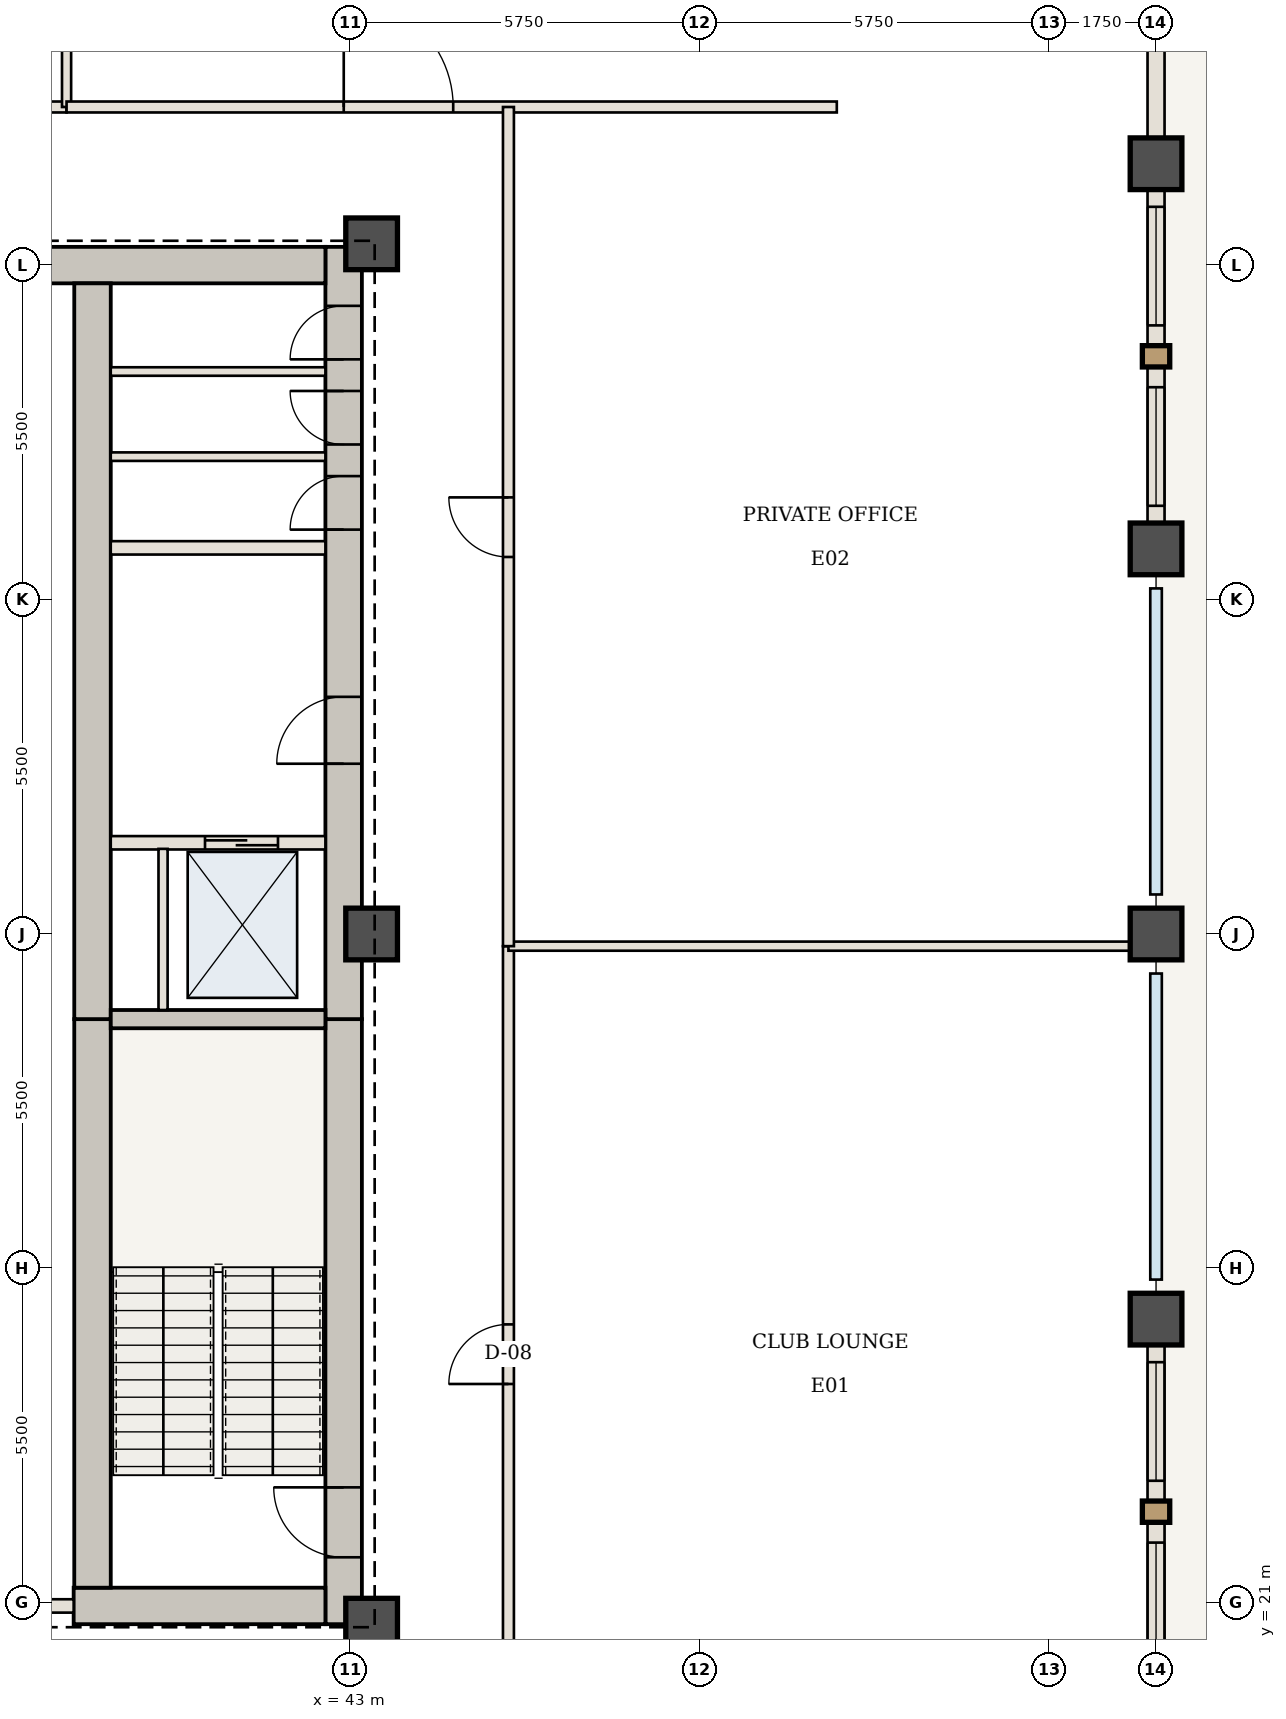
"""IFC4 building model, lengths in metres.
Left out: names, types, materials, properties, quantities, classifications, styles, units other than length and angle.
Written with IfcOpenShell. Run it as: python <this file> out.ifc"""

import sys

from ifc_helpers import new_model, si_unit, direction, frame, frame_2d, origin, origin_2d, place, context, subcontext, project, spatial, rectangle, extrude, element, fill, save


model = new_model("IFC4")
c1 = context("Model", 3, precision=1e-05, world=origin(), true_north=direction((0.0, 1.0)))
c2 = subcontext(c1, "Body", "Model", "MODEL_VIEW")
j1 = project(units=[si_unit("LENGTHUNIT", "METRE"), si_unit("PLANEANGLEUNIT", "RADIAN")], contexts=[c1])
p1 = place(None, origin())
s1 = spatial("IfcSite", under=j1, at=p1, CompositionType="ELEMENT")
p2 = place(p1, origin())
s2 = spatial("IfcBuilding", under=s1, at=p2, CompositionType="ELEMENT")
p3 = place(p2, frame((0.0, 0.0, 182.35)))
s3 = spatial("IfcBuildingStorey", under=s2, at=p3, CompositionType="ELEMENT", Elevation=182.35)
p4 = place(p3, frame((42.89, 20.65, 0.0), z_axis=(0.0, 0.0, 1.0), x_axis=(0.0, 1.0, 0.0)))
e1 = element("IfcWall", 1, at=p4, inside=s3, PredefinedType="SHEAR", context=c2, shape_type="SweptSolid", body=[
    extrude(rectangle(XDim=9.95, YDim=0.6, at=frame_2d((4.975, 0.0))), origin(), (0.0, 0.0, 1.0), 4.55),
])
p5 = place(p4, frame((1.1, 0.0, 0.0)))
e2 = element("IfcOpeningElement", 2, at=p5, cuts=e1, PredefinedType="OPENING", context=c2, shape_type="SweptSolid", body=[
    extrude(rectangle(XDim=1.15, YDim=2.15, at=frame_2d((0.575, 1.075))), frame((0.0, 0.31, 0.0), z_axis=(0.0, -1.0, 0.0), x_axis=(1.0, 0.0, 0.0)), (0.0, 0.0, 1.0), 0.62),
])
p6 = place(p3, frame((42.89, 30.6, 0.0), z_axis=(0.0, 0.0, 1.0), x_axis=(0.0, 1.0, 0.0)))
e3 = element("IfcWall", 3, at=p6, inside=s3, PredefinedType="SHEAR", context=c2, shape_type="SweptSolid", body=[
    extrude(rectangle(XDim=12.7, YDim=0.6, at=frame_2d((6.35, 0.0))), origin(), (0.0, 0.0, 1.0), 4.55),
])
p7 = place(p6, frame((4.2, 0.0, 0.0)))
e4 = element("IfcOpeningElement", 4, at=p7, cuts=e3, PredefinedType="OPENING", context=c2, shape_type="SweptSolid", body=[
    extrude(rectangle(XDim=1.1, YDim=2.15, at=frame_2d((0.55, 1.075))), frame((0.0, 0.31, 0.0), z_axis=(0.0, -1.0, 0.0), x_axis=(1.0, 0.0, 0.0)), (0.0, 0.0, 1.0), 0.62),
])
p8 = place(p6, frame((8.05, 0.0, 0.0)))
e5 = element("IfcOpeningElement", 5, at=p8, cuts=e3, PredefinedType="OPENING", context=c2, shape_type="SweptSolid", body=[
    extrude(rectangle(XDim=0.88, YDim=2.1, at=frame_2d((0.44, 1.05))), frame((0.0, 0.31, 0.0), z_axis=(0.0, -1.0, 0.0), x_axis=(1.0, 0.0, 0.0)), (0.0, 0.0, 1.0), 0.62),
])
p9 = place(p6, frame((9.45, 0.0, 0.0)))
e6 = element("IfcOpeningElement", 6, at=p9, cuts=e3, PredefinedType="OPENING", context=c2, shape_type="SweptSolid", body=[
    extrude(rectangle(XDim=0.88, YDim=2.1, at=frame_2d((0.44, 1.05))), frame((0.0, 0.31, 0.0), z_axis=(0.0, -1.0, 0.0), x_axis=(1.0, 0.0, 0.0)), (0.0, 0.0, 1.0), 0.62),
])
p10 = place(p6, frame((10.85, 0.0, 0.0)))
e7 = element("IfcOpeningElement", 7, at=p10, cuts=e3, PredefinedType="OPENING", context=c2, shape_type="SweptSolid", body=[
    extrude(rectangle(XDim=0.88, YDim=2.1, at=frame_2d((0.44, 1.05))), frame((0.0, 0.31, 0.0), z_axis=(0.0, -1.0, 0.0), x_axis=(1.0, 0.0, 0.0)), (0.0, 0.0, 1.0), 0.62),
])
p11 = place(p3, frame((38.45, 20.95, 0.0), z_axis=(0.0, 0.0, 1.0), x_axis=(1.0, 0.0, 0.0)))
e8 = element("IfcWall", 8, at=p11, inside=s3, PredefinedType="SHEAR", context=c2, shape_type="SweptSolid", body=[
    extrude(rectangle(XDim=4.14, YDim=0.6, at=frame_2d((2.07, 0.0))), origin(), (0.0, 0.0, 1.0), 4.55),
])
p12 = place(p3, frame((37.75, 43.0, 0.0), z_axis=(0.0, 0.0, 1.0), x_axis=(1.0, 0.0, 0.0)))
e9 = element("IfcWall", 9, at=p12, inside=s3, PredefinedType="SHEAR", context=c2, shape_type="SweptSolid", body=[
    extrude(rectangle(XDim=4.84, YDim=0.6, at=frame_2d((2.42, 0.0))), origin(), (0.0, 0.0, 1.0), 4.55),
])
p13 = place(p3, frame((38.76, 21.25, 0.0), z_axis=(0.0, 0.0, 1.0), x_axis=(0.0, 1.0, 0.0)))
e10 = element("IfcWall", 10, at=p13, inside=s3, PredefinedType="SHEAR", context=c2, shape_type="SweptSolid", body=[
    extrude(rectangle(XDim=9.35, YDim=0.6, at=frame_2d((4.675, 0.0))), origin(), (0.0, 0.0, 1.0), 4.55),
])
p14 = place(p3, frame((38.76, 30.6, 0.0), z_axis=(0.0, 0.0, 1.0), x_axis=(0.0, 1.0, 0.0)))
e11 = element("IfcWall", 11, at=p14, inside=s3, PredefinedType="SHEAR", context=c2, shape_type="SweptSolid", body=[
    extrude(rectangle(XDim=12.1, YDim=0.6, at=frame_2d((6.05, 0.0))), origin(), (0.0, 0.0, 1.0), 4.55),
])
for number, where, z_axis, x_axis in (
    (12, (43.35, 20.65, 0.0), (0.0, 0.0, 1.0), (1.0, 0.0, 0.0)),
    (13, (43.35, 32.0, 0.0), (0.0, 0.0, 1.0), (1.0, 0.0, 0.0)),
    (14, (43.35, 43.35, 0.0), (0.0, 0.0, 1.0), (1.0, 0.0, 0.0)),
):
    element("IfcColumn", number, at=place(p3, frame(where, z_axis=z_axis, x_axis=x_axis)), inside=s3, PredefinedType="COLUMN", context=c2, shape_type="SweptSolid", body=[
        extrude(rectangle(XDim=0.85, YDim=0.85, at=origin_2d()), origin(), (0.0, 0.0, 1.0), 4.55),
    ])
for number, where, z_axis, x_axis in (
    (15, (56.25, 25.667, -0.42), (0.0, 0.0, 1.0), (1.0, 0.0, 0.0)),
    (16, (56.25, 32.0, -0.42), (0.0, 0.0, 1.0), (1.0, 0.0, 0.0)),
    (17, (56.25, 38.333, -0.42), (0.0, 0.0, 1.0), (1.0, 0.0, 0.0)),
    (18, (56.25, 44.667, -0.42), (0.0, 0.0, 1.0), (1.0, 0.0, 0.0)),
):
    element("IfcColumn", number, at=place(p3, frame(where, z_axis=z_axis, x_axis=x_axis)), inside=s3, PredefinedType="COLUMN", context=c2, shape_type="SweptSolid", body=[
        extrude(rectangle(XDim=0.85, YDim=0.85, at=origin_2d()), origin(), (0.0, 0.0, 1.0), 4.97),
    ])
p15 = place(p3, frame((39.06, 30.6, 0.0), z_axis=(0.0, 0.0, 1.0), x_axis=(1.0, 0.0, 0.0)))
e19 = element("IfcWall", 19, at=p15, inside=s3, PredefinedType="SHEAR", context=c2, shape_type="SweptSolid", body=[
    extrude(rectangle(XDim=3.53, YDim=0.3, at=frame_2d((1.765, 0.0))), origin(), (0.0, 0.0, 1.0), 4.13),
])
p16 = place(p3, frame((39.06, 33.5, 0.0), z_axis=(0.0, 0.0, 1.0), x_axis=(1.0, 0.0, 0.0)))
e20 = element("IfcWall", 20, at=p16, inside=s3, PredefinedType="STANDARD", context=c2, shape_type="SweptSolid", body=[
    extrude(rectangle(XDim=3.53, YDim=0.22, at=frame_2d((1.765, 0.0))), origin(), (0.0, 0.0, 1.0), 4.13),
])
p17 = place(p16, frame((1.55, 0.0, 0.0)))
e21 = element("IfcOpeningElement", 21, at=p17, cuts=e20, PredefinedType="OPENING", context=c2, shape_type="SweptSolid", body=[
    extrude(rectangle(XDim=1.2, YDim=2.2, at=frame_2d((0.6, 1.1))), frame((0.0, 0.12, 0.0), z_axis=(0.0, -1.0, 0.0), x_axis=(1.0, 0.0, 0.0)), (0.0, 0.0, 1.0), 0.24),
])
p18 = place(p3, frame((39.92, 30.75, 0.0), z_axis=(0.0, 0.0, 1.0), x_axis=(0.0, 1.0, 0.0)))
e22 = element("IfcWall", 22, at=p18, inside=s3, PredefinedType="STANDARD", context=c2, shape_type="SweptSolid", body=[
    extrude(rectangle(XDim=2.65, YDim=0.15, at=frame_2d((1.325, 0.0))), origin(), (0.0, 0.0, 1.0), 4.13),
])
p19 = place(p3, frame((39.06, 38.35, 0.0), z_axis=(0.0, 0.0, 1.0), x_axis=(1.0, 0.0, 0.0)))
e23 = element("IfcWall", 23, at=p19, inside=s3, PredefinedType="STANDARD", context=c2, shape_type="SweptSolid", body=[
    extrude(rectangle(XDim=3.53, YDim=0.22, at=frame_2d((1.765, 0.0))), origin(), (0.0, 0.0, 1.0), 4.13),
])
for number, where, z_axis, x_axis in (
    (24, (39.06, 39.85, 0.0), (0.0, 0.0, 1.0), (1.0, 0.0, 0.0)),
    (25, (39.06, 41.25, 0.0), (0.0, 0.0, 1.0), (1.0, 0.0, 0.0)),
):
    element("IfcWall", number, at=place(p3, frame(where, z_axis=z_axis, x_axis=x_axis)), inside=s3, PredefinedType="STANDARD", context=c2, shape_type="SweptSolid", body=[
        extrude(rectangle(XDim=3.53, YDim=0.14, at=frame_2d((1.765, 0.0))), origin(), (0.0, 0.0, 1.0), 4.13),
    ])
p20 = place(p3, frame((35.15, 20.95, 0.0), z_axis=(0.0, 0.0, 1.0), x_axis=(1.0, 0.0, 0.0)))
e26 = element("IfcWall", 26, at=p20, inside=s3, PredefinedType="STANDARD", context=c2, shape_type="SweptSolid", body=[
    extrude(rectangle(XDim=3.3, YDim=0.22, at=frame_2d((1.65, 0.0))), origin(), (0.0, 0.0, 1.0), 4.13),
])
p21 = place(p20, frame((1.1, 0.0, 0.0)))
e27 = element("IfcOpeningElement", 27, at=p21, cuts=e26, PredefinedType="OPENING", context=c2, shape_type="SweptSolid", body=[
    extrude(rectangle(XDim=1.1, YDim=2.15, at=frame_2d((0.55, 1.075))), frame((0.0, 0.12, 0.0), z_axis=(0.0, -1.0, 0.0), x_axis=(1.0, 0.0, 0.0)), (0.0, 0.0, 1.0), 0.24),
])
p22 = place(p3, frame((25.667, 45.6, 0.0), z_axis=(0.0, 0.0, 1.0), x_axis=(1.0, 0.0, 0.0)))
e28 = element("IfcWall", 28, at=p22, inside=s3, PredefinedType="STANDARD", context=c2, shape_type="SweptSolid", body=[
    extrude(rectangle(XDim=12.667, YDim=0.18, at=frame_2d((6.333, 0.0))), origin(), (0.0, 0.0, 1.0), 4.13),
])
p23 = place(p22, frame((7.283, 0.0, 0.0)))
e29 = element("IfcOpeningElement", 29, at=p23, cuts=e28, PredefinedType="OPENING", context=c2, shape_type="SweptSolid", body=[
    extrude(rectangle(XDim=1.8, YDim=2.35, at=frame_2d((0.9, 1.175))), frame((0.0, 0.1, 0.0), z_axis=(0.0, -1.0, 0.0), x_axis=(1.0, 0.0, 0.0)), (0.0, 0.0, 1.0), 0.2),
])
p24 = place(p3, frame((38.333, 45.6, 0.0), z_axis=(0.0, 0.0, 1.0), x_axis=(0.0, 1.0, 0.0)))
e30 = element("IfcWall", 30, at=p24, inside=s3, PredefinedType="STANDARD", context=c2, shape_type="SweptSolid", body=[
    extrude(rectangle(XDim=10.59, YDim=0.15, at=frame_2d((5.295, 0.0))), origin(), (0.0, 0.0, 1.0), 4.13),
])
p25 = place(p3, frame((38.333, 45.6, 0.0), z_axis=(0.0, 0.0, 1.0), x_axis=(1.0, 0.0, 0.0)))
e31 = element("IfcWall", 31, at=p25, inside=s3, PredefinedType="STANDARD", context=c2, shape_type="SweptSolid", body=[
    extrude(rectangle(XDim=12.667, YDim=0.18, at=frame_2d((6.333, 0.0))), origin(), (0.0, 0.0, 1.0), 4.13),
])
p26 = place(p25, frame((4.558, 0.0, 0.0)))
e32 = element("IfcOpeningElement", 32, at=p26, cuts=e31, PredefinedType="OPENING", context=c2, shape_type="SweptSolid", body=[
    extrude(rectangle(XDim=1.8, YDim=2.35, at=frame_2d((0.9, 1.175))), frame((0.0, 0.1, 0.0), z_axis=(0.0, -1.0, 0.0), x_axis=(1.0, 0.0, 0.0)), (0.0, 0.0, 1.0), 0.2),
])
p27 = place(p3, frame((45.6, 18.4, 0.0), z_axis=(0.0, 0.0, 1.0), x_axis=(0.0, 1.0, 0.0)))
e33 = element("IfcWall", 33, at=p27, inside=s3, PredefinedType="STANDARD", context=c2, shape_type="SweptSolid", body=[
    extrude(rectangle(XDim=13.4, YDim=0.18, at=frame_2d((6.7, 0.0))), origin(), (0.0, 0.0, 1.0), 4.13),
])
p28 = place(p27, frame((6.2, 0.0, 0.0)))
e34 = element("IfcOpeningElement", 34, at=p28, cuts=e33, PredefinedType="OPENING", context=c2, shape_type="SweptSolid", body=[
    extrude(rectangle(XDim=0.98, YDim=2.2, at=frame_2d((0.49, 1.1))), frame((0.0, 0.1, 0.0), z_axis=(0.0, -1.0, 0.0), x_axis=(1.0, 0.0, 0.0)), (0.0, 0.0, 1.0), 0.2),
])
p29 = place(p3, frame((45.6, 31.8, 0.0), z_axis=(0.0, 0.0, 1.0), x_axis=(1.0, 0.0, 0.0)))
e35 = element("IfcWall", 35, at=p29, inside=s3, PredefinedType="STANDARD", context=c2, shape_type="SweptSolid", body=[
    extrude(rectangle(XDim=10.59, YDim=0.15, at=frame_2d((5.295, 0.0))), origin(), (0.0, 0.0, 1.0), 3.579),
])
p30 = place(p3, frame((45.6, 31.8, 0.0), z_axis=(0.0, 0.0, 1.0), x_axis=(0.0, 1.0, 0.0)))
e36 = element("IfcWall", 36, at=p30, inside=s3, PredefinedType="STANDARD", context=c2, shape_type="SweptSolid", body=[
    extrude(rectangle(XDim=13.8, YDim=0.18, at=frame_2d((6.9, 0.0))), origin(), (0.0, 0.0, 1.0), 4.13),
])
p31 = place(p30, frame((6.4, 0.0, 0.0)))
e37 = element("IfcOpeningElement", 37, at=p31, cuts=e36, PredefinedType="OPENING", context=c2, shape_type="SweptSolid", body=[
    extrude(rectangle(XDim=0.98, YDim=2.2, at=frame_2d((0.49, 1.1))), frame((0.0, 0.1, 0.0), z_axis=(0.0, -1.0, 0.0), x_axis=(1.0, 0.0, 0.0)), (0.0, 0.0, 1.0), 0.2),
])
p32 = place(p3, frame((56.25, 25.667, 0.0), z_axis=(0.0, 0.0, 1.0), x_axis=(0.0, -1.0, 0.0)))
e38 = element("IfcWall", 38, at=p32, inside=s3, PredefinedType="USERDEFINED", context=c2, shape_type="SweptSolid", body=[
    extrude(rectangle(XDim=6.333, YDim=0.28, at=frame_2d((3.167, 0.0))), origin(), (0.0, 0.0, 1.0), 3.43),
])
p33 = place(p32, frame((0.708, 0.0, 0.85)))
e39 = element("IfcOpeningElement", 39, at=p33, cuts=e38, PredefinedType="OPENING", context=c2, shape_type="SweptSolid", body=[
    extrude(rectangle(XDim=1.95, YDim=2.2, at=frame_2d((0.975, 1.1))), frame((0.0, 0.15, 0.0), z_axis=(0.0, -1.0, 0.0), x_axis=(1.0, 0.0, 0.0)), (0.0, 0.0, 1.0), 0.3),
])
p34 = place(p32, frame((3.675, 0.0, 0.85)))
e40 = element("IfcOpeningElement", 40, at=p34, cuts=e38, PredefinedType="OPENING", context=c2, shape_type="SweptSolid", body=[
    extrude(rectangle(XDim=1.95, YDim=2.2, at=frame_2d((0.975, 1.1))), frame((0.0, 0.15, 0.0), z_axis=(0.0, -1.0, 0.0), x_axis=(1.0, 0.0, 0.0)), (0.0, 0.0, 1.0), 0.3),
])
p35 = place(p3, frame((56.25, 44.667, 0.0), z_axis=(0.0, 0.0, 1.0), x_axis=(0.0, -1.0, 0.0)))
e41 = element("IfcWall", 41, at=p35, inside=s3, PredefinedType="USERDEFINED", context=c2, shape_type="SweptSolid", body=[
    extrude(rectangle(XDim=6.333, YDim=0.28, at=frame_2d((3.167, 0.0))), origin(), (0.0, 0.0, 1.0), 3.43),
])
p36 = place(p35, frame((0.708, 0.0, 0.85)))
e42 = element("IfcOpeningElement", 42, at=p36, cuts=e41, PredefinedType="OPENING", context=c2, shape_type="SweptSolid", body=[
    extrude(rectangle(XDim=1.95, YDim=2.2, at=frame_2d((0.975, 1.1))), frame((0.0, 0.15, 0.0), z_axis=(0.0, -1.0, 0.0), x_axis=(1.0, 0.0, 0.0)), (0.0, 0.0, 1.0), 0.3),
])
p37 = place(p35, frame((3.675, 0.0, 0.85)))
e43 = element("IfcOpeningElement", 43, at=p37, cuts=e41, PredefinedType="OPENING", context=c2, shape_type="SweptSolid", body=[
    extrude(rectangle(XDim=1.95, YDim=2.2, at=frame_2d((0.975, 1.1))), frame((0.0, 0.15, 0.0), z_axis=(0.0, -1.0, 0.0), x_axis=(1.0, 0.0, 0.0)), (0.0, 0.0, 1.0), 0.3),
])
p38 = place(p3, frame((56.25, 51.0, 0.0), z_axis=(0.0, 0.0, 1.0), x_axis=(0.0, -1.0, 0.0)))
e44 = element("IfcWall", 44, at=p38, inside=s3, PredefinedType="USERDEFINED", context=c2, shape_type="SweptSolid", body=[
    extrude(rectangle(XDim=6.333, YDim=0.28, at=frame_2d((3.167, 0.0))), origin(), (0.0, 0.0, 1.0), 3.43),
])
p39 = place(p5, origin())
e45 = element("IfcDoor", 45, at=p39, inside=s3, OperationType="SINGLE_SWING_RIGHT", PredefinedType="DOOR", context=c2, shape_type="SweptSolid", body=[
    extrude(rectangle(XDim=1.15, YDim=2.15, at=frame_2d((0.575, 1.075))), frame((0.0, 0.025, 0.0), z_axis=(0.0, -1.0, 0.0), x_axis=(1.0, 0.0, 0.0)), (0.0, 0.0, 1.0), 0.05),
])
fill(e2, e45)
p40 = place(p7, origin())
e46 = element("IfcDoor", 46, at=p40, inside=s3, OperationType="SINGLE_SWING_LEFT", PredefinedType="DOOR", context=c2, shape_type="SweptSolid", body=[
    extrude(rectangle(XDim=1.1, YDim=2.15, at=frame_2d((0.55, 1.075))), frame((0.0, 0.025, 0.0), z_axis=(0.0, -1.0, 0.0), x_axis=(1.0, 0.0, 0.0)), (0.0, 0.0, 1.0), 0.05),
])
fill(e4, e46)
p41 = place(p8, origin())
e47 = element("IfcDoor", 47, at=p41, inside=s3, OperationType="SINGLE_SWING_LEFT", PredefinedType="DOOR", context=c2, shape_type="SweptSolid", body=[
    extrude(rectangle(XDim=0.88, YDim=2.1, at=frame_2d((0.44, 1.05))), frame((0.0, 0.025, 0.0), z_axis=(0.0, -1.0, 0.0), x_axis=(1.0, 0.0, 0.0)), (0.0, 0.0, 1.0), 0.05),
])
fill(e5, e47)
p42 = place(p9, origin())
e48 = element("IfcDoor", 48, at=p42, inside=s3, OperationType="SINGLE_SWING_RIGHT", PredefinedType="DOOR", context=c2, shape_type="SweptSolid", body=[
    extrude(rectangle(XDim=0.88, YDim=2.1, at=frame_2d((0.44, 1.05))), frame((0.0, 0.025, 0.0), z_axis=(0.0, -1.0, 0.0), x_axis=(1.0, 0.0, 0.0)), (0.0, 0.0, 1.0), 0.05),
])
fill(e6, e48)
p43 = place(p10, origin())
e49 = element("IfcDoor", 49, at=p43, inside=s3, OperationType="SINGLE_SWING_LEFT", PredefinedType="DOOR", context=c2, shape_type="SweptSolid", body=[
    extrude(rectangle(XDim=0.88, YDim=2.1, at=frame_2d((0.44, 1.05))), frame((0.0, 0.025, 0.0), z_axis=(0.0, -1.0, 0.0), x_axis=(1.0, 0.0, 0.0)), (0.0, 0.0, 1.0), 0.05),
])
fill(e7, e49)
p44 = place(p17, origin())
e50 = element("IfcDoor", 50, at=p44, inside=s3, OperationType="DOUBLE_DOOR_SLIDING", PredefinedType="DOOR", context=c2, shape_type="SweptSolid", body=[
    extrude(rectangle(XDim=1.2, YDim=2.2, at=frame_2d((0.6, 1.1))), frame((0.0, 0.025, 0.0), z_axis=(0.0, -1.0, 0.0), x_axis=(1.0, 0.0, 0.0)), (0.0, 0.0, 1.0), 0.05),
])
fill(e21, e50)
p45 = place(p26, origin())
e51 = element("IfcDoor", 51, at=p45, inside=s3, OperationType="SINGLE_SWING_LEFT", PredefinedType="DOOR", context=c2, shape_type="SweptSolid", body=[
    extrude(rectangle(XDim=1.8, YDim=2.35, at=frame_2d((0.9, 1.175))), frame((0.0, 0.025, 0.0), z_axis=(0.0, -1.0, 0.0), x_axis=(1.0, 0.0, 0.0)), (0.0, 0.0, 1.0), 0.05),
])
fill(e32, e51)
p46 = place(p28, origin())
e52 = element("IfcDoor", 52, at=p46, inside=s3, OperationType="SINGLE_SWING_LEFT", PredefinedType="DOOR", context=c2, shape_type="SweptSolid", body=[
    extrude(rectangle(XDim=0.98, YDim=2.2, at=frame_2d((0.49, 1.1))), frame((0.0, 0.025, 0.0), z_axis=(0.0, -1.0, 0.0), x_axis=(1.0, 0.0, 0.0)), (0.0, 0.0, 1.0), 0.05),
])
fill(e34, e52)
p47 = place(p31, origin())
e53 = element("IfcDoor", 53, at=p47, inside=s3, OperationType="SINGLE_SWING_RIGHT", PredefinedType="DOOR", context=c2, shape_type="SweptSolid", body=[
    extrude(rectangle(XDim=0.98, YDim=2.2, at=frame_2d((0.49, 1.1))), frame((0.0, 0.025, 0.0), z_axis=(0.0, -1.0, 0.0), x_axis=(1.0, 0.0, 0.0)), (0.0, 0.0, 1.0), 0.05),
])
fill(e37, e53)
p48 = place(p33, origin())
e54 = element("IfcWindow", 54, at=p48, inside=s3, PartitioningType="SINGLE_PANEL", PredefinedType="WINDOW", context=c2, shape_type="SweptSolid", body=[
    extrude(rectangle(XDim=1.95, YDim=2.2, at=frame_2d((0.975, 1.1))), frame((0.0, 0.03, 0.0), z_axis=(0.0, -1.0, 0.0), x_axis=(1.0, 0.0, 0.0)), (0.0, 0.0, 1.0), 0.06),
])
fill(e39, e54)
p49 = place(p34, origin())
e55 = element("IfcWindow", 55, at=p49, inside=s3, PartitioningType="SINGLE_PANEL", PredefinedType="WINDOW", context=c2, shape_type="SweptSolid", body=[
    extrude(rectangle(XDim=1.95, YDim=2.2, at=frame_2d((0.975, 1.1))), frame((0.0, 0.03, 0.0), z_axis=(0.0, -1.0, 0.0), x_axis=(1.0, 0.0, 0.0)), (0.0, 0.0, 1.0), 0.06),
])
fill(e40, e55)
p50 = place(p36, origin())
e56 = element("IfcWindow", 56, at=p50, inside=s3, PartitioningType="SINGLE_PANEL", PredefinedType="WINDOW", context=c2, shape_type="SweptSolid", body=[
    extrude(rectangle(XDim=1.95, YDim=2.2, at=frame_2d((0.975, 1.1))), frame((0.0, 0.03, 0.0), z_axis=(0.0, -1.0, 0.0), x_axis=(1.0, 0.0, 0.0)), (0.0, 0.0, 1.0), 0.06),
])
fill(e42, e56)
p51 = place(p37, origin())
e57 = element("IfcWindow", 57, at=p51, inside=s3, PartitioningType="SINGLE_PANEL", PredefinedType="WINDOW", context=c2, shape_type="SweptSolid", body=[
    extrude(rectangle(XDim=1.95, YDim=2.2, at=frame_2d((0.975, 1.1))), frame((0.0, 0.03, 0.0), z_axis=(0.0, -1.0, 0.0), x_axis=(1.0, 0.0, 0.0)), (0.0, 0.0, 1.0), 0.06),
])
fill(e43, e57)
save(model, sys.argv[1])
